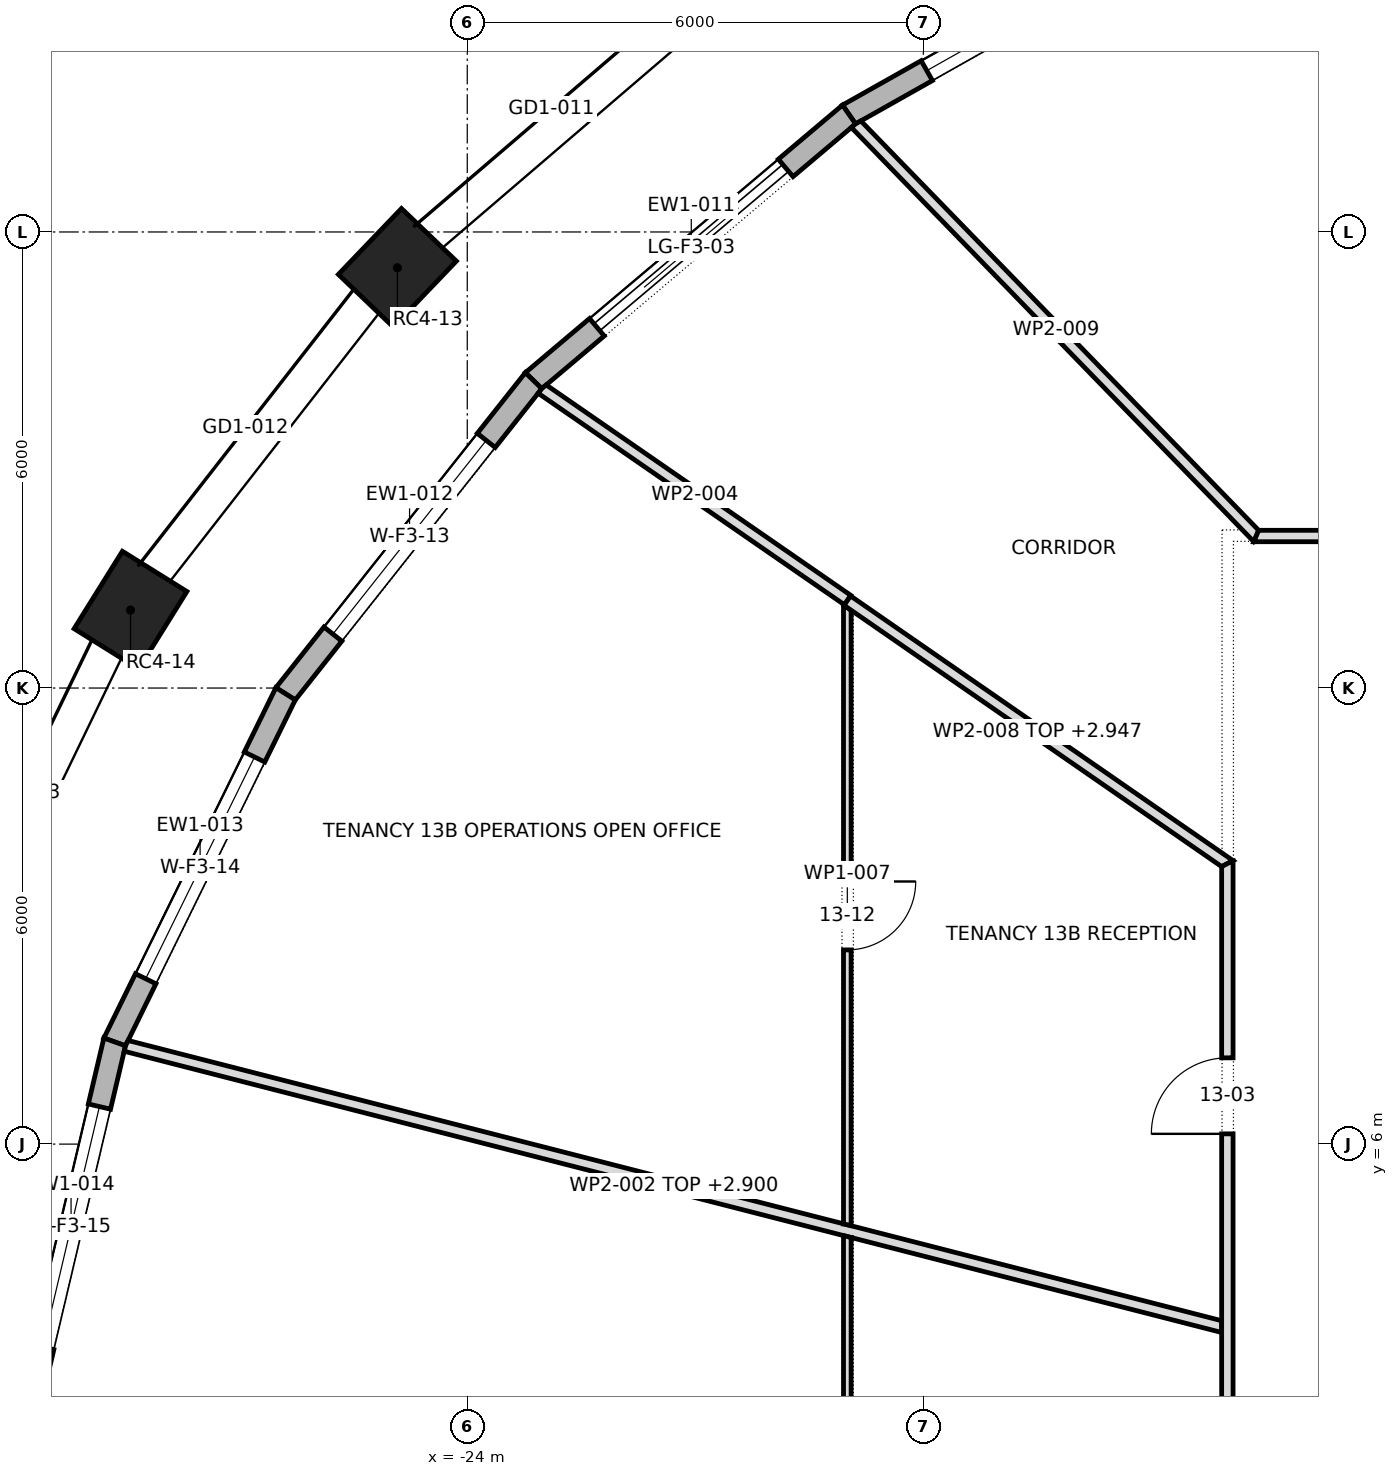
"""IFC4 building model, lengths in metres.
Left out: names, types, materials, properties, quantities, classifications, styles, units other than length and angle.
Written with IfcOpenShell. Run it as: python <this file> out.ifc"""

import sys

from ifc_helpers import new_model, si_unit, direction, frame, frame_2d, origin, origin_2d, place, context, subcontext, project, spatial, polyline, rectangle, outline, extrude, element, fill, save


model = new_model("IFC4")
c1 = context("Model", 3, precision=1e-05, world=origin(), true_north=direction((0.0, 1.0)))
c2 = subcontext(c1, "Body", "Model", "MODEL_VIEW")
j1 = project(units=[si_unit("LENGTHUNIT", "METRE"), si_unit("PLANEANGLEUNIT", "RADIAN")], contexts=[c1])
p1 = place(None, origin())
s1 = spatial("IfcSite", under=j1, at=p1, CompositionType="ELEMENT")
p2 = place(p1, origin())
s2 = spatial("IfcBuilding", under=s1, at=p2, CompositionType="ELEMENT")
p3 = place(p2, frame((0.0, 0.0, 198.9)))
s3 = spatial("IfcBuildingStorey", under=s2, at=p3, CompositionType="ELEMENT", Elevation=198.9)
for number, where, z_axis, x_axis in (
    (1, (-24.919, 17.529, 0.0), (0.0, 0.0, 1.0), (-0.692, -0.722, 0.0)),
    (2, (-28.43, 13.025, 0.0), (0.0, 0.0, 1.0), (-0.529, -0.849, 0.0)),
):
    element("IfcColumn", number, at=place(p3, frame(where, z_axis=z_axis, x_axis=x_axis)), inside=s3, PredefinedType="COLUMN", context=c2, shape_type="SweptSolid", body=[
        extrude(rectangle(XDim=1.2, YDim=1.0, at=origin_2d()), origin(), (0.0, 0.0, 1.0), 4.0),
    ])
p4 = place(p3, frame((-14.1, 22.295, 0.0), z_axis=(0.0, 0.0, 1.0), x_axis=(-0.871083701819, -0.491134588912, 0.0)))
e3 = element("IfcWall", 3, at=p4, inside=s3, PredefinedType="STANDARD", context=c2, shape_type="SweptSolid", body=[
    extrude(outline(polyline([(-0.013, -0.15), (5.614, -0.15), (5.585, 0.15), (0.013, 0.15), (-0.013, -0.15)])), origin(), (0.0, 0.0, 1.0), 3.7),
])
p5 = place(p4, frame((1.175, 0.0, 0.6)))
e4 = element("IfcOpeningElement", 4, at=p5, cuts=e3, PredefinedType="OPENING", context=c2, shape_type="SweptSolid", body=[
    extrude(rectangle(XDim=3.25, YDim=2.65, at=frame_2d((1.625, 1.325))), frame((0.0, 0.162, 0.0), z_axis=(0.0, -1.0, 0.0), x_axis=(1.0, 0.0, 0.0)), (0.0, 0.0, 1.0), 0.324),
])
p6 = place(p3, frame((-18.977, 19.545, 0.0), z_axis=(0.0, 0.0, 1.0), x_axis=(-0.764330261608, -0.644824977176, 0.0)))
e5 = element("IfcWall", 5, at=p6, inside=s3, PredefinedType="STANDARD", context=c2, shape_type="SweptSolid", body=[
    extrude(outline(polyline([(-0.014, -0.15), (5.445, -0.15), (5.415, 0.15), (0.014, 0.15), (-0.014, -0.15)])), origin(), (0.0, 0.0, 1.0), 3.7),
])
p7 = place(p6, frame((1.09, 0.0, 0.0)))
e6 = element("IfcOpeningElement", 6, at=p7, cuts=e5, PredefinedType="OPENING", context=c2, shape_type="SweptSolid", body=[
    extrude(rectangle(XDim=3.25, YDim=3.25, at=frame_2d((1.625, 1.625))), frame((0.0, 0.162, 0.0), z_axis=(0.0, -1.0, 0.0), x_axis=(1.0, 0.0, 0.0)), (0.0, 0.0, 1.0), 0.324),
])
p8 = place(p3, frame((-23.128, 16.044, 0.0), z_axis=(0.0, 0.0, 1.0), x_axis=(-0.620829074232, -0.783945955145, 0.0)))
e7 = element("IfcWall", 7, at=p8, inside=s3, PredefinedType="STANDARD", context=c2, shape_type="SweptSolid", body=[
    extrude(outline(polyline([(-0.015, -0.15), (5.271, -0.15), (5.239, 0.15), (0.015, 0.15), (-0.015, -0.15)])), origin(), (0.0, 0.0, 1.0), 3.7),
])
p9 = place(p8, frame((1.003, 0.0, 0.6)))
e8 = element("IfcOpeningElement", 8, at=p9, cuts=e7, PredefinedType="OPENING", context=c2, shape_type="SweptSolid", body=[
    extrude(rectangle(XDim=3.25, YDim=2.65, at=frame_2d((1.625, 1.325))), frame((0.0, 0.162, 0.0), z_axis=(0.0, -1.0, 0.0), x_axis=(1.0, 0.0, 0.0)), (0.0, 0.0, 1.0), 0.324),
])
p10 = place(p3, frame((-26.39, 11.924, 0.0), z_axis=(0.0, 0.0, 1.0), x_axis=(-0.440694221881, -0.897657285829, 0.0)))
e9 = element("IfcWall", 9, at=p10, inside=s3, PredefinedType="STANDARD", context=c2, shape_type="SweptSolid", body=[
    extrude(outline(polyline([(-0.016, -0.15), (5.119, -0.15), (5.085, 0.15), (0.016, 0.15), (-0.016, -0.15)])), origin(), (0.0, 0.0, 1.0), 3.7),
])
p11 = place(p10, frame((0.926, 0.0, 0.6)))
e10 = element("IfcOpeningElement", 10, at=p11, cuts=e9, PredefinedType="OPENING", context=c2, shape_type="SweptSolid", body=[
    extrude(rectangle(XDim=3.25, YDim=2.65, at=frame_2d((1.625, 1.325))), frame((0.0, 0.162, 0.0), z_axis=(0.0, -1.0, 0.0), x_axis=(1.0, 0.0, 0.0)), (0.0, 0.0, 1.0), 0.324),
])
p12 = place(p3, frame((-28.639, 7.344, 0.0), z_axis=(0.0, 0.0, 1.0), x_axis=(-0.229455912692, -0.97331905567, 0.0)))
e11 = element("IfcWall", 11, at=p12, inside=s3, PredefinedType="STANDARD", context=c2, shape_type="SweptSolid", body=[
    extrude(outline(polyline([(-0.017, -0.15), (5.015, -0.15), (4.98, 0.15), (0.017, 0.15), (-0.017, -0.15)])), origin(), (0.0, 0.0, 1.0), 3.7),
])
p13 = place(p12, frame((0.874, 0.0, 0.6)))
e12 = element("IfcOpeningElement", 12, at=p13, cuts=e11, PredefinedType="OPENING", context=c2, shape_type="SweptSolid", body=[
    extrude(rectangle(XDim=3.25, YDim=2.65, at=frame_2d((1.625, 1.325))), frame((0.0, 0.162, 0.0), z_axis=(0.0, -1.0, 0.0), x_axis=(1.0, 0.0, 0.0)), (0.0, 0.0, 1.0), 0.324),
])
p14 = place(p3, frame((-28.494, 7.294, 0.0), z_axis=(0.0, 0.0, 1.0), x_axis=(0.96870063855, -0.248231893342, 0.0)))
e13 = element("IfcWall", 13, at=p14, inside=s3, PredefinedType="PARTITIONING", context=c2, shape_type="SweptSolid", body=[
    extrude(outline(polyline([(0.0, -0.075), (1.973, -0.075), (3.947, -0.075), (5.92, -0.075), (7.893, -0.075), (9.866, -0.075), (9.872, -0.073), (9.872, -0.075), (11.549, -0.075), (13.227, -0.075), (14.904, -0.075), (14.904, -0.074), (14.866, 0.075), (13.156, 0.075), (11.446, 0.075), (9.736, 0.075), (9.731, 0.073), (9.73, 0.075), (7.787, 0.075), (5.844, 0.075), (3.901, 0.075), (1.957, 0.075), (0.014, 0.075), (0.0, 0.008), (0.0, -0.075)])), origin(), (0.0, 0.0, 1.0), 2.9),
])
p15 = place(p3, frame((-23.024, 15.94, 0.0), z_axis=(0.0, 0.0, 1.0), x_axis=(0.822739240619, -0.568418984505, 0.0)))
e14 = element("IfcWall", 14, at=p15, inside=s3, PredefinedType="PARTITIONING", context=c2, shape_type="SweptSolid", body=[
    extrude(outline(polyline([(4.897, 0.075), (3.273, 0.075), (1.649, 0.075), (0.025, 0.075), (0.005, 0.002), (0.0, -0.069), (0.0, -0.075), (1.632, -0.075), (3.264, -0.075), (4.897, -0.075), (4.897, 0.075)])), origin(), (0.0, 0.0, 1.0), 3.7),
])
p16 = place(p3, frame((-19.0, -4.796, 0.0), z_axis=(0.0, 0.0, 1.0), x_axis=(0.0, 1.0, 0.0)))
e15 = element("IfcWall", 15, at=p16, inside=s3, PredefinedType="PARTITIONING", context=c2, shape_type="SweptSolid", body=[
    extrude(outline(polyline([(0.025, -0.05), (1.934, -0.05), (3.842, -0.05), (5.75, -0.05), (7.659, -0.05), (9.567, -0.05), (9.593, 0.049), (9.593, 0.05), (7.674, 0.05), (5.756, 0.05), (3.837, 0.05), (1.918, 0.05), (0.0, 0.05), (0.0, 0.049), (0.025, -0.05)])), origin(), (0.0, 0.0, 1.0), 3.7),
])
p17 = place(p16, frame((4.346, 0.0, 0.0)))
e16 = element("IfcOpeningElement", 16, at=p17, cuts=e15, PredefinedType="OPENING", context=c2, shape_type="SweptSolid", body=[
    extrude(rectangle(XDim=0.9, YDim=2.1, at=frame_2d((0.45, 1.05))), frame((0.0, 0.062, 0.0), z_axis=(0.0, -1.0, 0.0), x_axis=(1.0, 0.0, 0.0)), (0.0, 0.0, 1.0), 0.124),
])
p18 = place(p3, frame((-19.0, 4.926, 0.0), z_axis=(0.0, 0.0, 1.0), x_axis=(0.0, 1.0, 0.0)))
e17 = element("IfcWall", 17, at=p18, inside=s3, PredefinedType="PARTITIONING", context=c2, shape_type="SweptSolid", body=[
    extrude(outline(polyline([(0.0, -0.05), (1.62, -0.05), (3.239, -0.05), (4.859, -0.05), (6.479, -0.05), (8.098, -0.05), (8.162, 0.043), (8.169, 0.038), (8.177, 0.05), (8.177, 0.05), (6.547, 0.05), (4.917, 0.05), (3.286, 0.05), (1.656, 0.05), (0.025, 0.05), (0.0, -0.049), (0.0, -0.05)])), origin(), (0.0, 0.0, 1.0), 3.7),
])
p19 = place(p18, frame((3.629, 0.0, 0.0)))
e18 = element("IfcOpeningElement", 18, at=p19, cuts=e17, PredefinedType="OPENING", context=c2, shape_type="SweptSolid", body=[
    extrude(rectangle(XDim=0.9, YDim=2.1, at=frame_2d((0.45, 1.05))), frame((0.0, 0.062, 0.0), z_axis=(0.0, -1.0, 0.0), x_axis=(1.0, 0.0, 0.0)), (0.0, 0.0, 1.0), 0.124),
])
p20 = place(p3, frame((-19.0, 13.15, 0.0), z_axis=(0.0, 0.0, 1.0), x_axis=(0.822301327334, -0.569052306088, 0.0)))
e19 = element("IfcWall", 19, at=p20, inside=s3, PredefinedType="PARTITIONING", context=c2, shape_type="SweptSolid", body=[
    extrude(outline(polyline([(0.0, -0.075), (1.51, -0.075), (3.021, -0.075), (4.531, -0.075), (6.041, -0.075), (6.12, 0.075), (4.59, 0.075), (3.06, 0.075), (1.53, 0.075), (0.0, 0.075), (0.0, -0.075)])), origin(), (0.0, 0.0, 1.0), 2.947),
])
p21 = place(p3, frame((-18.893, 19.427, 0.0), z_axis=(0.0, 0.0, 1.0), x_axis=(0.696864554069, -0.717202756048, 0.0)))
e20 = element("IfcWall", 20, at=p21, inside=s3, PredefinedType="PARTITIONING", context=c2, shape_type="SweptSolid", body=[
    extrude(outline(polyline([(0.0, -0.075), (1.9, -0.075), (3.799, -0.075), (5.699, -0.075), (7.599, -0.075), (7.567, 0.0), (7.535, 0.075), (5.658, 0.075), (3.78, 0.075), (1.903, 0.075), (0.025, 0.075), (0.005, -0.003), (0.0, -0.073), (0.0, -0.075)])), origin(), (0.0, 0.0, 1.0), 3.7),
])
p22 = place(p3, frame((-14.0, -9.729, 0.0), z_axis=(0.0, 0.0, 1.0), x_axis=(0.0, 1.0, 0.0)))
e21 = element("IfcWall", 21, at=p22, inside=s3, PredefinedType="PARTITIONING", context=c2, shape_type="SweptSolid", body=[
    extrude(outline(polyline([(19.458, -0.075), (19.458, -0.075), (19.38, 0.075), (17.45, 0.075), (15.52, 0.075), (13.59, 0.075), (11.659, 0.075), (9.729, 0.075), (7.799, 0.075), (5.869, 0.075), (3.939, 0.075), (2.009, 0.075), (0.079, 0.075), (0.0, -0.075), (0.0, -0.075), (1.946, -0.075), (3.892, -0.075), (5.838, -0.075), (7.783, -0.075), (9.729, -0.075), (11.675, -0.075), (13.621, -0.075), (15.567, -0.075), (17.513, -0.075), (19.458, -0.075)])), origin(), (0.0, 0.0, 1.0), 3.7),
])
p23 = place(p22, frame((15.864, 0.0, 0.0)))
e22 = element("IfcOpeningElement", 22, at=p23, cuts=e21, PredefinedType="OPENING", context=c2, shape_type="SweptSolid", body=[
    extrude(rectangle(XDim=1.0, YDim=2.1, at=frame_2d((0.5, 1.05))), frame((0.0, 0.087, 0.0), z_axis=(0.0, -1.0, 0.0), x_axis=(1.0, 0.0, 0.0)), (0.0, 0.0, 1.0), 0.174),
])
p24 = place(p22, frame((9.229, 0.0, 0.0)))
e23 = element("IfcOpeningElement", 23, at=p24, cuts=e21, PredefinedType="OPENING", context=c2, shape_type="SweptSolid", body=[
    extrude(rectangle(XDim=1.0, YDim=2.1, at=frame_2d((0.5, 1.05))), frame((0.0, 0.087, 0.0), z_axis=(0.0, -1.0, 0.0), x_axis=(1.0, 0.0, 0.0)), (0.0, 0.0, 1.0), 0.174),
])
p25 = place(p22, frame((2.594, 0.0, 0.0)))
e24 = element("IfcOpeningElement", 24, at=p25, cuts=e21, PredefinedType="OPENING", context=c2, shape_type="SweptSolid", body=[
    extrude(rectangle(XDim=1.0, YDim=2.1, at=frame_2d((0.5, 1.05))), frame((0.0, 0.087, 0.0), z_axis=(0.0, -1.0, 0.0), x_axis=(1.0, 0.0, 0.0)), (0.0, 0.0, 1.0), 0.174),
])
p26 = place(p3, frame((-13.652, 14.0, 0.0), z_axis=(0.0, 0.0, 1.0), x_axis=(1.0, 0.0, 0.0)))
e25 = element("IfcWall", 25, at=p26, inside=s3, PredefinedType="PARTITIONING", context=c2, shape_type="SweptSolid", body=[
    extrude(outline(polyline([(27.303, -0.075), (27.303, -0.075), (27.24, 0.075), (25.299, 0.075), (23.358, 0.075), (21.416, 0.075), (19.475, 0.075), (17.534, 0.075), (15.593, 0.075), (13.652, 0.075), (11.71, 0.075), (9.769, 0.075), (7.828, 0.075), (5.887, 0.075), (3.946, 0.075), (2.004, 0.075), (0.063, 0.075), (0.0, -0.075), (0.0, -0.075), (1.95, -0.075), (3.9, -0.075), (5.851, -0.075), (7.801, -0.075), (9.751, -0.075), (11.701, -0.075), (13.652, -0.075), (15.602, -0.075), (17.552, -0.075), (19.502, -0.075), (21.453, -0.075), (23.403, -0.075), (25.353, -0.075), (27.303, -0.075)])), origin(), (0.0, 0.0, 1.0), 3.7),
])
p27 = place(p26, frame((19.562, 0.0, 0.0)))
e26 = element("IfcOpeningElement", 26, at=p27, cuts=e25, PredefinedType="OPENING", context=c2, shape_type="SweptSolid", body=[
    extrude(rectangle(XDim=1.8, YDim=2.1, at=frame_2d((0.9, 1.05))), frame((0.0, 0.087, 0.0), z_axis=(0.0, -1.0, 0.0), x_axis=(1.0, 0.0, 0.0)), (0.0, 0.0, 1.0), 0.174),
])
p28 = place(p26, frame((5.942, 0.0, 0.0)))
e27 = element("IfcOpeningElement", 27, at=p28, cuts=e25, PredefinedType="OPENING", context=c2, shape_type="SweptSolid", body=[
    extrude(rectangle(XDim=1.8, YDim=2.1, at=frame_2d((0.9, 1.05))), frame((0.0, 0.087, 0.0), z_axis=(0.0, -1.0, 0.0), x_axis=(1.0, 0.0, 0.0)), (0.0, 0.0, 1.0), 0.174),
])
p29 = place(p5, origin())
e28 = element("IfcWindow", 28, at=p29, inside=s3, PartitioningType="TRIPLE_PANEL_VERTICAL", PredefinedType="WINDOW", context=c2, shape_type="SweptSolid", body=[
    extrude(rectangle(XDim=3.25, YDim=2.65, at=frame_2d((1.625, 1.325))), frame((0.0, 0.03, 0.0), z_axis=(0.0, -1.0, 0.0), x_axis=(1.0, 0.0, 0.0)), (0.0, 0.0, 1.0), 0.06),
])
fill(e4, e28)
p30 = place(p7, origin())
e29 = element("IfcDoor", 29, at=p30, inside=s3, OperationType="DOUBLE_DOOR_SLIDING", PredefinedType="DOOR", context=c2, shape_type="SweptSolid", body=[
    extrude(rectangle(XDim=3.25, YDim=3.25, at=frame_2d((1.625, 1.625))), frame((0.0, 0.025, 0.0), z_axis=(0.0, -1.0, 0.0), x_axis=(1.0, 0.0, 0.0)), (0.0, 0.0, 1.0), 0.05),
])
fill(e6, e29)
p31 = place(p9, origin())
e30 = element("IfcWindow", 30, at=p31, inside=s3, PartitioningType="TRIPLE_PANEL_VERTICAL", PredefinedType="WINDOW", context=c2, shape_type="SweptSolid", body=[
    extrude(rectangle(XDim=3.25, YDim=2.65, at=frame_2d((1.625, 1.325))), frame((0.0, 0.03, 0.0), z_axis=(0.0, -1.0, 0.0), x_axis=(1.0, 0.0, 0.0)), (0.0, 0.0, 1.0), 0.06),
])
fill(e8, e30)
p32 = place(p11, origin())
e31 = element("IfcWindow", 31, at=p32, inside=s3, PartitioningType="TRIPLE_PANEL_VERTICAL", PredefinedType="WINDOW", context=c2, shape_type="SweptSolid", body=[
    extrude(rectangle(XDim=3.25, YDim=2.65, at=frame_2d((1.625, 1.325))), frame((0.0, 0.03, 0.0), z_axis=(0.0, -1.0, 0.0), x_axis=(1.0, 0.0, 0.0)), (0.0, 0.0, 1.0), 0.06),
])
fill(e10, e31)
p33 = place(p13, origin())
e32 = element("IfcWindow", 32, at=p33, inside=s3, PartitioningType="TRIPLE_PANEL_VERTICAL", PredefinedType="WINDOW", context=c2, shape_type="SweptSolid", body=[
    extrude(rectangle(XDim=3.25, YDim=2.65, at=frame_2d((1.625, 1.325))), frame((0.0, 0.03, 0.0), z_axis=(0.0, -1.0, 0.0), x_axis=(1.0, 0.0, 0.0)), (0.0, 0.0, 1.0), 0.06),
])
fill(e12, e32)
p34 = place(p23, origin())
e33 = element("IfcDoor", 33, at=p34, inside=s3, OperationType="SINGLE_SWING_RIGHT", PredefinedType="DOOR", context=c2, shape_type="SweptSolid", body=[
    extrude(rectangle(XDim=1.0, YDim=2.1, at=frame_2d((0.5, 1.05))), frame((0.0, 0.025, 0.0), z_axis=(0.0, -1.0, 0.0), x_axis=(1.0, 0.0, 0.0)), (0.0, 0.0, 1.0), 0.05),
])
fill(e22, e33)
p35 = place(p19, frame((0.9, 0.0, 0.0), z_axis=(0.0, 0.0, 1.0), x_axis=(-1.0, 0.0, 0.0)))
e34 = element("IfcDoor", 34, at=p35, inside=s3, OperationType="SINGLE_SWING_RIGHT", PredefinedType="DOOR", context=c2, shape_type="SweptSolid", body=[
    extrude(rectangle(XDim=0.9, YDim=2.1, at=frame_2d((0.45, 1.05))), frame((0.0, 0.025, 0.0), z_axis=(0.0, -1.0, 0.0), x_axis=(1.0, 0.0, 0.0)), (0.0, 0.0, 1.0), 0.05),
])
fill(e18, e34)
save(model, sys.argv[1])
